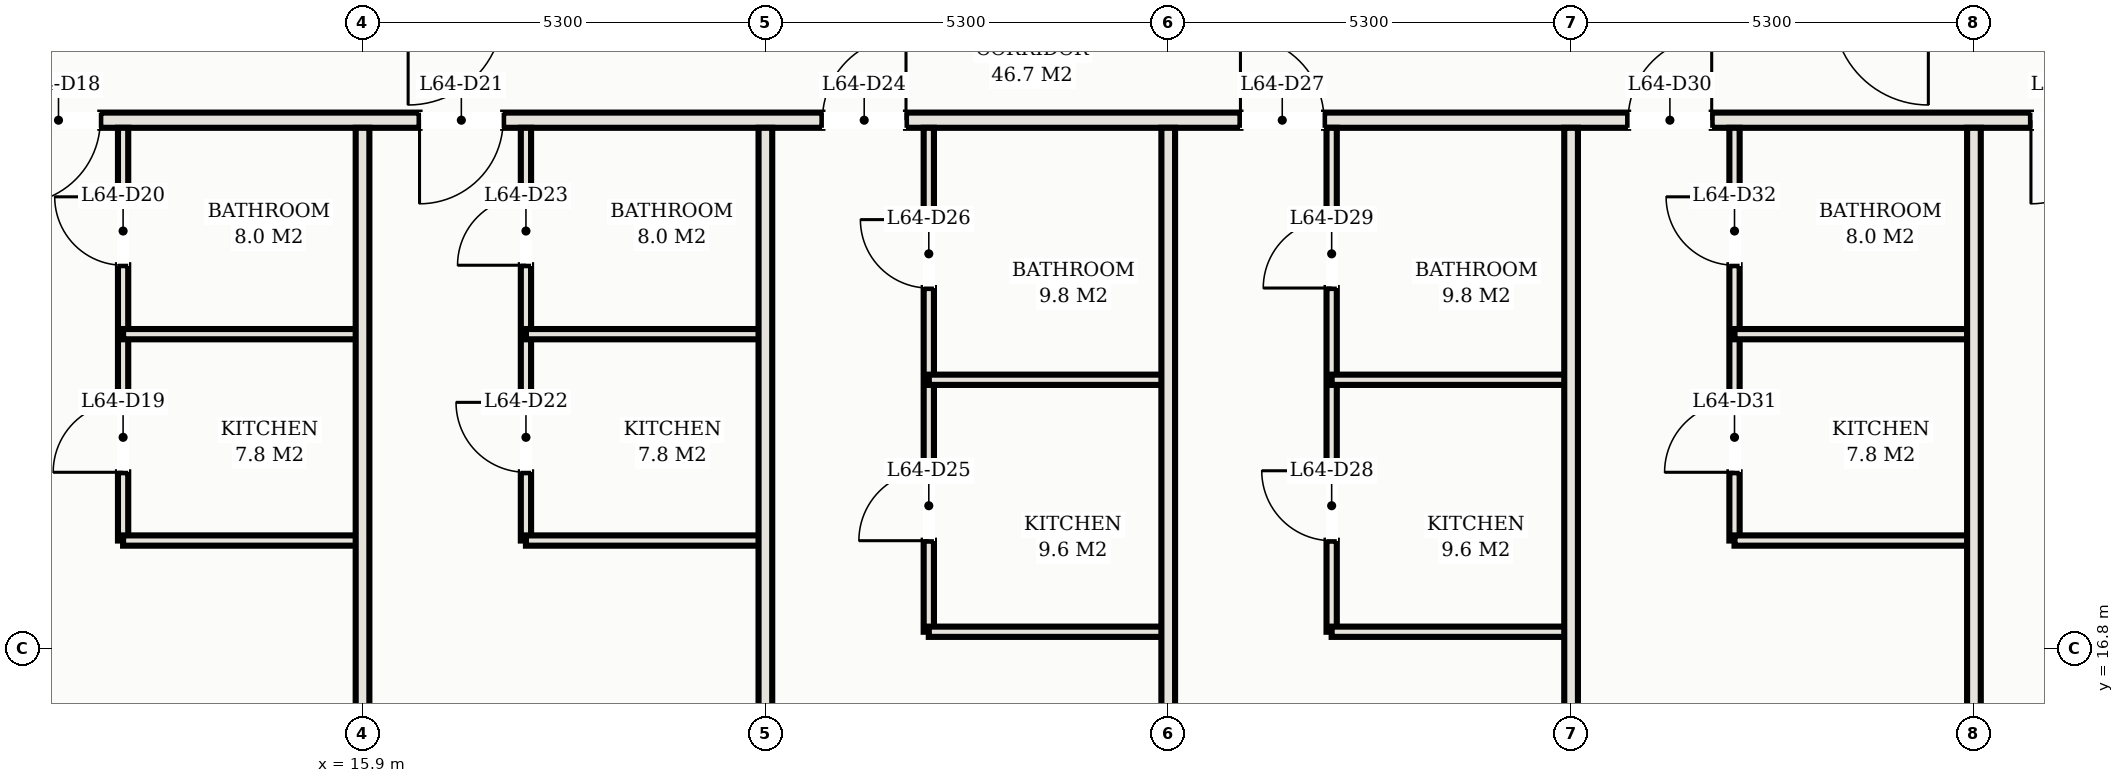
"""IFC4 building model, lengths in metres.
Left out: names, types, materials, properties, quantities, classifications, styles, units other than length and angle.
Written with IfcOpenShell. Run it as: python <this file> out.ifc"""

import sys

from ifc_helpers import new_model, si_unit, direction, frame, frame_2d, origin, place, context, subcontext, project, spatial, rectangle, extrude, element, fill, save


model = new_model("IFC4")
c1 = context("Model", 3, precision=1e-05, world=origin(), true_north=direction((0.0, 1.0)))
c2 = subcontext(c1, "Body", "Model", "MODEL_VIEW")
j1 = project(units=[si_unit("LENGTHUNIT", "METRE"), si_unit("PLANEANGLEUNIT", "RADIAN")], contexts=[c1])
p1 = place(None, origin())
s1 = spatial("IfcSite", under=j1, at=p1, CompositionType="ELEMENT")
p2 = place(p1, origin())
s2 = spatial("IfcBuilding", under=s1, at=p2, CompositionType="ELEMENT")
p3 = place(p2, frame((0.0, 0.0, 233.0)))
s3 = spatial("IfcBuildingStorey", under=s2, at=p3, CompositionType="ELEMENT", Elevation=233.0)
p4 = place(p3, frame((8.6, 23.75, 0.0), z_axis=(0.0, 0.0, 1.0), x_axis=(1.0, 0.0, 0.0)))
e1 = element("IfcWall", 1, at=p4, inside=s3, PredefinedType="PARTITIONING", context=c2, shape_type="SweptSolid", body=[
    extrude(rectangle(XDim=35.8, YDim=0.2, at=frame_2d((17.9, 0.0))), origin(), (0.0, 0.0, 1.0), 2.45),
])
p5 = place(p4, frame((2.75, 0.0, 0.0)))
e2 = element("IfcOpeningElement", 2, at=p5, cuts=e1, PredefinedType="OPENING", context=c2, shape_type="SweptSolid", body=[
    extrude(rectangle(XDim=1.1, YDim=2.25, at=frame_2d((0.55, 1.125))), frame((0.0, 0.11, 0.0), z_axis=(0.0, -1.0, 0.0), x_axis=(1.0, 0.0, 0.0)), (0.0, 0.0, 1.0), 0.22),
])
p6 = place(p4, frame((8.05, 0.0, 0.0)))
e3 = element("IfcOpeningElement", 3, at=p6, cuts=e1, PredefinedType="OPENING", context=c2, shape_type="SweptSolid", body=[
    extrude(rectangle(XDim=1.1, YDim=2.25, at=frame_2d((0.55, 1.125))), frame((0.0, 0.11, 0.0), z_axis=(0.0, -1.0, 0.0), x_axis=(1.0, 0.0, 0.0)), (0.0, 0.0, 1.0), 0.22),
])
p7 = place(p4, frame((13.35, 0.0, 0.0)))
e4 = element("IfcOpeningElement", 4, at=p7, cuts=e1, PredefinedType="OPENING", context=c2, shape_type="SweptSolid", body=[
    extrude(rectangle(XDim=1.1, YDim=2.25, at=frame_2d((0.55, 1.125))), frame((0.0, 0.11, 0.0), z_axis=(0.0, -1.0, 0.0), x_axis=(1.0, 0.0, 0.0)), (0.0, 0.0, 1.0), 0.22),
])
p8 = place(p4, frame((18.85, 0.0, 0.0)))
e5 = element("IfcOpeningElement", 5, at=p8, cuts=e1, PredefinedType="OPENING", context=c2, shape_type="SweptSolid", body=[
    extrude(rectangle(XDim=1.1, YDim=2.25, at=frame_2d((0.55, 1.125))), frame((0.0, 0.11, 0.0), z_axis=(0.0, -1.0, 0.0), x_axis=(1.0, 0.0, 0.0)), (0.0, 0.0, 1.0), 0.22),
])
p9 = place(p4, frame((23.95, 0.0, 0.0)))
e6 = element("IfcOpeningElement", 6, at=p9, cuts=e1, PredefinedType="OPENING", context=c2, shape_type="SweptSolid", body=[
    extrude(rectangle(XDim=1.1, YDim=2.25, at=frame_2d((0.55, 1.125))), frame((0.0, 0.11, 0.0), z_axis=(0.0, -1.0, 0.0), x_axis=(1.0, 0.0, 0.0)), (0.0, 0.0, 1.0), 0.22),
])
p10 = place(p4, frame((29.25, 0.0, 0.0)))
e7 = element("IfcOpeningElement", 7, at=p10, cuts=e1, PredefinedType="OPENING", context=c2, shape_type="SweptSolid", body=[
    extrude(rectangle(XDim=1.1, YDim=2.25, at=frame_2d((0.55, 1.125))), frame((0.0, 0.11, 0.0), z_axis=(0.0, -1.0, 0.0), x_axis=(1.0, 0.0, 0.0)), (0.0, 0.0, 1.0), 0.22),
])
p11 = place(p4, frame((0.505, 0.0, 0.0)))
e8 = element("IfcOpeningElement", 8, at=p11, cuts=e1, PredefinedType="OPENING", context=c2, shape_type="SweptSolid", body=[
    extrude(rectangle(XDim=0.9, YDim=2.15, at=frame_2d((0.45, 1.075))), frame((0.0, 0.11, 0.0), z_axis=(0.0, -1.0, 0.0), x_axis=(1.0, 0.0, 0.0)), (0.0, 0.0, 1.0), 0.22),
])
p12 = place(p4, frame((34.395, 0.0, 0.0)))
e9 = element("IfcOpeningElement", 9, at=p12, cuts=e1, PredefinedType="OPENING", context=c2, shape_type="SweptSolid", body=[
    extrude(rectangle(XDim=0.9, YDim=2.15, at=frame_2d((0.45, 1.075))), frame((0.0, 0.11, 0.0), z_axis=(0.0, -1.0, 0.0), x_axis=(1.0, 0.0, 0.0)), (0.0, 0.0, 1.0), 0.22),
])
p13 = place(p3, frame((12.75, 18.22, 0.0), z_axis=(0.0, 0.0, 1.0), x_axis=(0.0, 1.0, 0.0)))
e10 = element("IfcWall", 10, at=p13, inside=s3, PredefinedType="PARTITIONING", context=c2, shape_type="SweptSolid", body=[
    extrude(rectangle(XDim=5.43, YDim=0.135, at=frame_2d((2.715, 0.0))), origin(), (0.0, 0.0, 1.0), 2.45),
])
p14 = place(p13, frame((0.898, 0.0, 0.0)))
e11 = element("IfcOpeningElement", 11, at=p14, cuts=e10, PredefinedType="OPENING", context=c2, shape_type="SweptSolid", body=[
    extrude(rectangle(XDim=0.92, YDim=2.15, at=frame_2d((0.46, 1.075))), frame((0.0, 0.078, 0.0), z_axis=(0.0, -1.0, 0.0), x_axis=(1.0, 0.0, 0.0)), (0.0, 0.0, 1.0), 0.155),
])
p15 = place(p13, frame((3.622, 0.0, 0.0)))
e12 = element("IfcOpeningElement", 12, at=p15, cuts=e10, PredefinedType="OPENING", context=c2, shape_type="SweptSolid", body=[
    extrude(rectangle(XDim=0.9, YDim=2.15, at=frame_2d((0.45, 1.075))), frame((0.0, 0.078, 0.0), z_axis=(0.0, -1.0, 0.0), x_axis=(1.0, 0.0, 0.0)), (0.0, 0.0, 1.0), 0.155),
])
for number, where, z_axis, x_axis in (
    (13, (12.75, 18.22, 0.0), (0.0, 0.0, 1.0), (1.0, 0.0, 0.0)),
    (14, (12.75, 20.935, 0.0), (0.0, 0.0, 1.0), (1.0, 0.0, 0.0)),
):
    element("IfcWall", number, at=place(p3, frame(where, z_axis=z_axis, x_axis=x_axis)), inside=s3, PredefinedType="PARTITIONING", context=c2, shape_type="SweptSolid", body=[
        extrude(rectangle(XDim=3.15, YDim=0.135, at=frame_2d((1.575, 0.0))), origin(), (0.0, 0.0, 1.0), 2.45),
    ])
p16 = place(p3, frame((15.9, 8.42, 0.0), z_axis=(0.0, 0.0, 1.0), x_axis=(0.0, 1.0, 0.0)))
e15 = element("IfcWall", 15, at=p16, inside=s3, PredefinedType="PARTITIONING", context=c2, shape_type="SweptSolid", body=[
    extrude(rectangle(XDim=15.23, YDim=0.18, at=frame_2d((7.615, 0.0))), origin(), (0.0, 0.0, 1.0), 2.45),
])
p17 = place(p3, frame((18.05, 18.22, 0.0), z_axis=(0.0, 0.0, 1.0), x_axis=(0.0, 1.0, 0.0)))
e16 = element("IfcWall", 16, at=p17, inside=s3, PredefinedType="PARTITIONING", context=c2, shape_type="SweptSolid", body=[
    extrude(rectangle(XDim=5.43, YDim=0.135, at=frame_2d((2.715, 0.0))), origin(), (0.0, 0.0, 1.0), 2.45),
])
p18 = place(p17, frame((0.898, 0.0, 0.0)))
e17 = element("IfcOpeningElement", 17, at=p18, cuts=e16, PredefinedType="OPENING", context=c2, shape_type="SweptSolid", body=[
    extrude(rectangle(XDim=0.92, YDim=2.15, at=frame_2d((0.46, 1.075))), frame((0.0, 0.078, 0.0), z_axis=(0.0, -1.0, 0.0), x_axis=(1.0, 0.0, 0.0)), (0.0, 0.0, 1.0), 0.155),
])
p19 = place(p17, frame((3.622, 0.0, 0.0)))
e18 = element("IfcOpeningElement", 18, at=p19, cuts=e16, PredefinedType="OPENING", context=c2, shape_type="SweptSolid", body=[
    extrude(rectangle(XDim=0.9, YDim=2.15, at=frame_2d((0.45, 1.075))), frame((0.0, 0.078, 0.0), z_axis=(0.0, -1.0, 0.0), x_axis=(1.0, 0.0, 0.0)), (0.0, 0.0, 1.0), 0.155),
])
for number, where, z_axis, x_axis in (
    (19, (18.05, 18.22, 0.0), (0.0, 0.0, 1.0), (1.0, 0.0, 0.0)),
    (20, (18.05, 20.935, 0.0), (0.0, 0.0, 1.0), (1.0, 0.0, 0.0)),
):
    element("IfcWall", number, at=place(p3, frame(where, z_axis=z_axis, x_axis=x_axis)), inside=s3, PredefinedType="PARTITIONING", context=c2, shape_type="SweptSolid", body=[
        extrude(rectangle(XDim=3.15, YDim=0.135, at=frame_2d((1.575, 0.0))), origin(), (0.0, 0.0, 1.0), 2.45),
    ])
p20 = place(p3, frame((21.2, 8.098, 0.0), z_axis=(0.0, 0.0, 1.0), x_axis=(0.0, 1.0, 0.0)))
e21 = element("IfcWall", 21, at=p20, inside=s3, PredefinedType="PARTITIONING", context=c2, shape_type="SweptSolid", body=[
    extrude(rectangle(XDim=15.552, YDim=0.18, at=frame_2d((7.776, 0.0))), origin(), (0.0, 0.0, 1.0), 2.45),
])
p21 = place(p3, frame((23.35, 17.02, 0.0), z_axis=(0.0, 0.0, 1.0), x_axis=(0.0, 1.0, 0.0)))
e22 = element("IfcWall", 22, at=p21, inside=s3, PredefinedType="PARTITIONING", context=c2, shape_type="SweptSolid", body=[
    extrude(rectangle(XDim=6.63, YDim=0.135, at=frame_2d((3.315, 0.0))), origin(), (0.0, 0.0, 1.0), 2.45),
])
p22 = place(p21, frame((1.198, 0.0, 0.0)))
e23 = element("IfcOpeningElement", 23, at=p22, cuts=e22, PredefinedType="OPENING", context=c2, shape_type="SweptSolid", body=[
    extrude(rectangle(XDim=0.92, YDim=2.15, at=frame_2d((0.46, 1.075))), frame((0.0, 0.078, 0.0), z_axis=(0.0, -1.0, 0.0), x_axis=(1.0, 0.0, 0.0)), (0.0, 0.0, 1.0), 0.155),
])
p23 = place(p21, frame((4.522, 0.0, 0.0)))
e24 = element("IfcOpeningElement", 24, at=p23, cuts=e22, PredefinedType="OPENING", context=c2, shape_type="SweptSolid", body=[
    extrude(rectangle(XDim=0.9, YDim=2.15, at=frame_2d((0.45, 1.075))), frame((0.0, 0.078, 0.0), z_axis=(0.0, -1.0, 0.0), x_axis=(1.0, 0.0, 0.0)), (0.0, 0.0, 1.0), 0.155),
])
for number, where, z_axis, x_axis in (
    (25, (23.35, 17.02, 0.0), (0.0, 0.0, 1.0), (1.0, 0.0, 0.0)),
    (26, (23.35, 20.335, 0.0), (0.0, 0.0, 1.0), (1.0, 0.0, 0.0)),
):
    element("IfcWall", number, at=place(p3, frame(where, z_axis=z_axis, x_axis=x_axis)), inside=s3, PredefinedType="PARTITIONING", context=c2, shape_type="SweptSolid", body=[
        extrude(rectangle(XDim=3.15, YDim=0.135, at=frame_2d((1.575, 0.0))), origin(), (0.0, 0.0, 1.0), 2.45),
    ])
p24 = place(p3, frame((26.5, 6.92, 0.0), z_axis=(0.0, 0.0, 1.0), x_axis=(0.0, 1.0, 0.0)))
e27 = element("IfcWall", 27, at=p24, inside=s3, PredefinedType="PARTITIONING", context=c2, shape_type="SweptSolid", body=[
    extrude(rectangle(XDim=16.73, YDim=0.18, at=frame_2d((8.365, 0.0))), origin(), (0.0, 0.0, 1.0), 2.45),
])
p25 = place(p3, frame((28.65, 17.02, 0.0), z_axis=(0.0, 0.0, 1.0), x_axis=(0.0, 1.0, 0.0)))
e28 = element("IfcWall", 28, at=p25, inside=s3, PredefinedType="PARTITIONING", context=c2, shape_type="SweptSolid", body=[
    extrude(rectangle(XDim=6.63, YDim=0.135, at=frame_2d((3.315, 0.0))), origin(), (0.0, 0.0, 1.0), 2.45),
])
p26 = place(p25, frame((1.198, 0.0, 0.0)))
e29 = element("IfcOpeningElement", 29, at=p26, cuts=e28, PredefinedType="OPENING", context=c2, shape_type="SweptSolid", body=[
    extrude(rectangle(XDim=0.92, YDim=2.15, at=frame_2d((0.46, 1.075))), frame((0.0, 0.078, 0.0), z_axis=(0.0, -1.0, 0.0), x_axis=(1.0, 0.0, 0.0)), (0.0, 0.0, 1.0), 0.155),
])
p27 = place(p25, frame((4.522, 0.0, 0.0)))
e30 = element("IfcOpeningElement", 30, at=p27, cuts=e28, PredefinedType="OPENING", context=c2, shape_type="SweptSolid", body=[
    extrude(rectangle(XDim=0.9, YDim=2.15, at=frame_2d((0.45, 1.075))), frame((0.0, 0.078, 0.0), z_axis=(0.0, -1.0, 0.0), x_axis=(1.0, 0.0, 0.0)), (0.0, 0.0, 1.0), 0.155),
])
for number, where, z_axis, x_axis in (
    (31, (28.65, 17.02, 0.0), (0.0, 0.0, 1.0), (1.0, 0.0, 0.0)),
    (32, (28.65, 20.335, 0.0), (0.0, 0.0, 1.0), (1.0, 0.0, 0.0)),
):
    element("IfcWall", number, at=place(p3, frame(where, z_axis=z_axis, x_axis=x_axis)), inside=s3, PredefinedType="PARTITIONING", context=c2, shape_type="SweptSolid", body=[
        extrude(rectangle(XDim=3.15, YDim=0.135, at=frame_2d((1.575, 0.0))), origin(), (0.0, 0.0, 1.0), 2.45),
    ])
p28 = place(p3, frame((31.8, 8.098, 0.0), z_axis=(0.0, 0.0, 1.0), x_axis=(0.0, 1.0, 0.0)))
e33 = element("IfcWall", 33, at=p28, inside=s3, PredefinedType="PARTITIONING", context=c2, shape_type="SweptSolid", body=[
    extrude(rectangle(XDim=15.552, YDim=0.18, at=frame_2d((7.776, 0.0))), origin(), (0.0, 0.0, 1.0), 2.45),
])
p29 = place(p3, frame((33.95, 18.22, 0.0), z_axis=(0.0, 0.0, 1.0), x_axis=(0.0, 1.0, 0.0)))
e34 = element("IfcWall", 34, at=p29, inside=s3, PredefinedType="PARTITIONING", context=c2, shape_type="SweptSolid", body=[
    extrude(rectangle(XDim=5.43, YDim=0.135, at=frame_2d((2.715, 0.0))), origin(), (0.0, 0.0, 1.0), 2.45),
])
p30 = place(p29, frame((0.898, 0.0, 0.0)))
e35 = element("IfcOpeningElement", 35, at=p30, cuts=e34, PredefinedType="OPENING", context=c2, shape_type="SweptSolid", body=[
    extrude(rectangle(XDim=0.92, YDim=2.15, at=frame_2d((0.46, 1.075))), frame((0.0, 0.078, 0.0), z_axis=(0.0, -1.0, 0.0), x_axis=(1.0, 0.0, 0.0)), (0.0, 0.0, 1.0), 0.155),
])
p31 = place(p29, frame((3.622, 0.0, 0.0)))
e36 = element("IfcOpeningElement", 36, at=p31, cuts=e34, PredefinedType="OPENING", context=c2, shape_type="SweptSolid", body=[
    extrude(rectangle(XDim=0.9, YDim=2.15, at=frame_2d((0.45, 1.075))), frame((0.0, 0.078, 0.0), z_axis=(0.0, -1.0, 0.0), x_axis=(1.0, 0.0, 0.0)), (0.0, 0.0, 1.0), 0.155),
])
for number, where, z_axis, x_axis in (
    (37, (33.95, 18.22, 0.0), (0.0, 0.0, 1.0), (1.0, 0.0, 0.0)),
    (38, (33.95, 20.935, 0.0), (0.0, 0.0, 1.0), (1.0, 0.0, 0.0)),
):
    element("IfcWall", number, at=place(p3, frame(where, z_axis=z_axis, x_axis=x_axis)), inside=s3, PredefinedType="PARTITIONING", context=c2, shape_type="SweptSolid", body=[
        extrude(rectangle(XDim=3.15, YDim=0.135, at=frame_2d((1.575, 0.0))), origin(), (0.0, 0.0, 1.0), 2.45),
    ])
p32 = place(p3, frame((37.1, 8.42, 0.0), z_axis=(0.0, 0.0, 1.0), x_axis=(0.0, 1.0, 0.0)))
e39 = element("IfcWall", 39, at=p32, inside=s3, PredefinedType="PARTITIONING", context=c2, shape_type="SweptSolid", body=[
    extrude(rectangle(XDim=15.23, YDim=0.18, at=frame_2d((7.615, 0.0))), origin(), (0.0, 0.0, 1.0), 2.45),
])
p33 = place(p5, frame((1.1, 0.0, 0.0), z_axis=(0.0, 0.0, 1.0), x_axis=(-1.0, 0.0, 0.0)))
e40 = element("IfcDoor", 40, at=p33, inside=s3, OperationType="SINGLE_SWING_RIGHT", PredefinedType="DOOR", context=c2, shape_type="SweptSolid", body=[
    extrude(rectangle(XDim=1.1, YDim=2.25, at=frame_2d((0.55, 1.125))), frame((0.0, 0.025, 0.0), z_axis=(0.0, -1.0, 0.0), x_axis=(1.0, 0.0, 0.0)), (0.0, 0.0, 1.0), 0.05),
])
fill(e2, e40)
p34 = place(p14, origin())
e41 = element("IfcDoor", 41, at=p34, inside=s3, OperationType="SINGLE_SWING_LEFT", PredefinedType="DOOR", context=c2, shape_type="SweptSolid", body=[
    extrude(rectangle(XDim=0.92, YDim=2.15, at=frame_2d((0.46, 1.075))), frame((0.0, 0.025, 0.0), z_axis=(0.0, -1.0, 0.0), x_axis=(1.0, 0.0, 0.0)), (0.0, 0.0, 1.0), 0.05),
])
fill(e11, e41)
p35 = place(p15, origin())
e42 = element("IfcDoor", 42, at=p35, inside=s3, OperationType="SINGLE_SWING_RIGHT", PredefinedType="DOOR", context=c2, shape_type="SweptSolid", body=[
    extrude(rectangle(XDim=0.9, YDim=2.15, at=frame_2d((0.45, 1.075))), frame((0.0, 0.025, 0.0), z_axis=(0.0, -1.0, 0.0), x_axis=(1.0, 0.0, 0.0)), (0.0, 0.0, 1.0), 0.05),
])
fill(e12, e42)
p36 = place(p6, frame((1.1, 0.0, 0.0), z_axis=(0.0, 0.0, 1.0), x_axis=(-1.0, 0.0, 0.0)))
e43 = element("IfcDoor", 43, at=p36, inside=s3, OperationType="SINGLE_SWING_RIGHT", PredefinedType="DOOR", context=c2, shape_type="SweptSolid", body=[
    extrude(rectangle(XDim=1.1, YDim=2.25, at=frame_2d((0.55, 1.125))), frame((0.0, 0.025, 0.0), z_axis=(0.0, -1.0, 0.0), x_axis=(1.0, 0.0, 0.0)), (0.0, 0.0, 1.0), 0.05),
])
fill(e3, e43)
p37 = place(p18, origin())
e44 = element("IfcDoor", 44, at=p37, inside=s3, OperationType="SINGLE_SWING_RIGHT", PredefinedType="DOOR", context=c2, shape_type="SweptSolid", body=[
    extrude(rectangle(XDim=0.92, YDim=2.15, at=frame_2d((0.46, 1.075))), frame((0.0, 0.025, 0.0), z_axis=(0.0, -1.0, 0.0), x_axis=(1.0, 0.0, 0.0)), (0.0, 0.0, 1.0), 0.05),
])
fill(e17, e44)
p38 = place(p19, origin())
e45 = element("IfcDoor", 45, at=p38, inside=s3, OperationType="SINGLE_SWING_LEFT", PredefinedType="DOOR", context=c2, shape_type="SweptSolid", body=[
    extrude(rectangle(XDim=0.9, YDim=2.15, at=frame_2d((0.45, 1.075))), frame((0.0, 0.025, 0.0), z_axis=(0.0, -1.0, 0.0), x_axis=(1.0, 0.0, 0.0)), (0.0, 0.0, 1.0), 0.05),
])
fill(e18, e45)
p39 = place(p7, origin())
e46 = element("IfcDoor", 46, at=p39, inside=s3, OperationType="SINGLE_SWING_RIGHT", PredefinedType="DOOR", context=c2, shape_type="SweptSolid", body=[
    extrude(rectangle(XDim=1.1, YDim=2.25, at=frame_2d((0.55, 1.125))), frame((0.0, 0.025, 0.0), z_axis=(0.0, -1.0, 0.0), x_axis=(1.0, 0.0, 0.0)), (0.0, 0.0, 1.0), 0.05),
])
fill(e4, e46)
p40 = place(p22, origin())
e47 = element("IfcDoor", 47, at=p40, inside=s3, OperationType="SINGLE_SWING_LEFT", PredefinedType="DOOR", context=c2, shape_type="SweptSolid", body=[
    extrude(rectangle(XDim=0.92, YDim=2.15, at=frame_2d((0.46, 1.075))), frame((0.0, 0.025, 0.0), z_axis=(0.0, -1.0, 0.0), x_axis=(1.0, 0.0, 0.0)), (0.0, 0.0, 1.0), 0.05),
])
fill(e23, e47)
p41 = place(p23, origin())
e48 = element("IfcDoor", 48, at=p41, inside=s3, OperationType="SINGLE_SWING_RIGHT", PredefinedType="DOOR", context=c2, shape_type="SweptSolid", body=[
    extrude(rectangle(XDim=0.9, YDim=2.15, at=frame_2d((0.45, 1.075))), frame((0.0, 0.025, 0.0), z_axis=(0.0, -1.0, 0.0), x_axis=(1.0, 0.0, 0.0)), (0.0, 0.0, 1.0), 0.05),
])
fill(e24, e48)
p42 = place(p8, origin())
e49 = element("IfcDoor", 49, at=p42, inside=s3, OperationType="SINGLE_SWING_LEFT", PredefinedType="DOOR", context=c2, shape_type="SweptSolid", body=[
    extrude(rectangle(XDim=1.1, YDim=2.25, at=frame_2d((0.55, 1.125))), frame((0.0, 0.025, 0.0), z_axis=(0.0, -1.0, 0.0), x_axis=(1.0, 0.0, 0.0)), (0.0, 0.0, 1.0), 0.05),
])
fill(e5, e49)
p43 = place(p26, origin())
e50 = element("IfcDoor", 50, at=p43, inside=s3, OperationType="SINGLE_SWING_RIGHT", PredefinedType="DOOR", context=c2, shape_type="SweptSolid", body=[
    extrude(rectangle(XDim=0.92, YDim=2.15, at=frame_2d((0.46, 1.075))), frame((0.0, 0.025, 0.0), z_axis=(0.0, -1.0, 0.0), x_axis=(1.0, 0.0, 0.0)), (0.0, 0.0, 1.0), 0.05),
])
fill(e29, e50)
p44 = place(p27, origin())
e51 = element("IfcDoor", 51, at=p44, inside=s3, OperationType="SINGLE_SWING_LEFT", PredefinedType="DOOR", context=c2, shape_type="SweptSolid", body=[
    extrude(rectangle(XDim=0.9, YDim=2.15, at=frame_2d((0.45, 1.075))), frame((0.0, 0.025, 0.0), z_axis=(0.0, -1.0, 0.0), x_axis=(1.0, 0.0, 0.0)), (0.0, 0.0, 1.0), 0.05),
])
fill(e30, e51)
p45 = place(p9, origin())
e52 = element("IfcDoor", 52, at=p45, inside=s3, OperationType="SINGLE_SWING_RIGHT", PredefinedType="DOOR", context=c2, shape_type="SweptSolid", body=[
    extrude(rectangle(XDim=1.1, YDim=2.25, at=frame_2d((0.55, 1.125))), frame((0.0, 0.025, 0.0), z_axis=(0.0, -1.0, 0.0), x_axis=(1.0, 0.0, 0.0)), (0.0, 0.0, 1.0), 0.05),
])
fill(e6, e52)
p46 = place(p30, origin())
e53 = element("IfcDoor", 53, at=p46, inside=s3, OperationType="SINGLE_SWING_LEFT", PredefinedType="DOOR", context=c2, shape_type="SweptSolid", body=[
    extrude(rectangle(XDim=0.92, YDim=2.15, at=frame_2d((0.46, 1.075))), frame((0.0, 0.025, 0.0), z_axis=(0.0, -1.0, 0.0), x_axis=(1.0, 0.0, 0.0)), (0.0, 0.0, 1.0), 0.05),
])
fill(e35, e53)
p47 = place(p31, origin())
e54 = element("IfcDoor", 54, at=p47, inside=s3, OperationType="SINGLE_SWING_RIGHT", PredefinedType="DOOR", context=c2, shape_type="SweptSolid", body=[
    extrude(rectangle(XDim=0.9, YDim=2.15, at=frame_2d((0.45, 1.075))), frame((0.0, 0.025, 0.0), z_axis=(0.0, -1.0, 0.0), x_axis=(1.0, 0.0, 0.0)), (0.0, 0.0, 1.0), 0.05),
])
fill(e36, e54)
p48 = place(p10, frame((1.1, 0.0, 0.0), z_axis=(0.0, 0.0, 1.0), x_axis=(-1.0, 0.0, 0.0)))
e55 = element("IfcDoor", 55, at=p48, inside=s3, OperationType="SINGLE_SWING_RIGHT", PredefinedType="DOOR", context=c2, shape_type="SweptSolid", body=[
    extrude(rectangle(XDim=1.1, YDim=2.25, at=frame_2d((0.55, 1.125))), frame((0.0, 0.025, 0.0), z_axis=(0.0, -1.0, 0.0), x_axis=(1.0, 0.0, 0.0)), (0.0, 0.0, 1.0), 0.05),
])
fill(e7, e55)
save(model, sys.argv[1])
